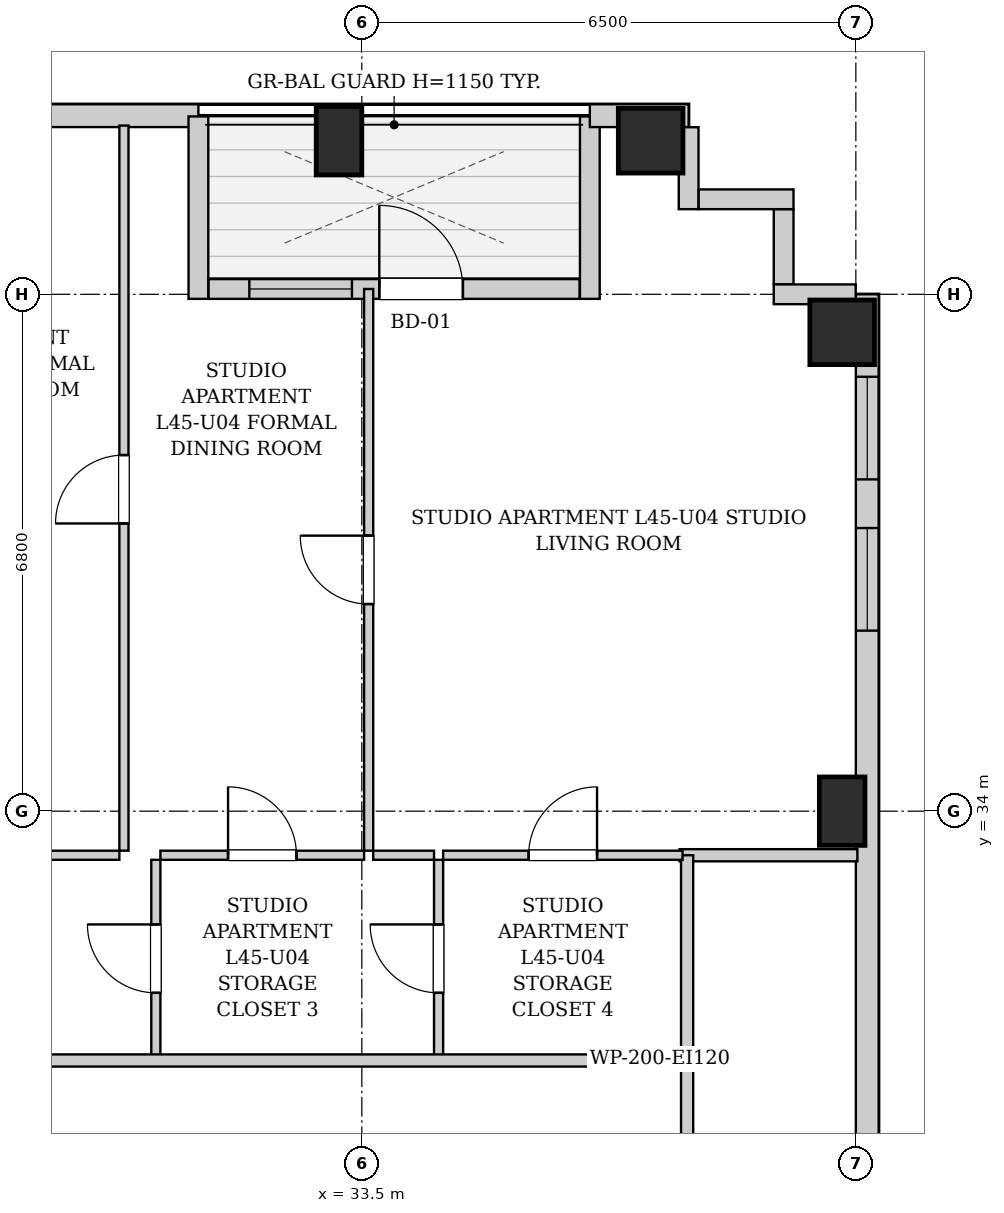
"""IFC4 building model, lengths in metres.
Left out: names, types, materials, properties, quantities, classifications, styles, units other than length and angle.
Written with IfcOpenShell. Run it as: python <this file> out.ifc"""

import sys

from ifc_helpers import new_model, si_unit, direction, frame, frame_2d, origin, origin_2d, place, context, subcontext, project, spatial, rectangle, extrude, element, fill, save


model = new_model("IFC4")
c1 = context("Model", 3, precision=1e-05, world=origin(), true_north=direction((0.0, 1.0)))
c2 = subcontext(c1, "Body", "Model", "MODEL_VIEW")
j1 = project(units=[si_unit("LENGTHUNIT", "METRE"), si_unit("PLANEANGLEUNIT", "RADIAN")], contexts=[c1])
p1 = place(None, origin())
s1 = spatial("IfcSite", under=j1, at=p1, CompositionType="ELEMENT")
p2 = place(p1, origin())
s2 = spatial("IfcBuilding", under=s1, at=p2, CompositionType="ELEMENT")
p3 = place(p2, frame((0.0, 0.0, 156.9)))
s3 = spatial("IfcBuildingStorey", under=s2, at=p3, CompositionType="ELEMENT", Elevation=156.9)
p4 = place(p3, frame((33.2, 42.82, 0.0), z_axis=(0.0, 0.0, 1.0), x_axis=(1.0, 0.0, 0.0)))
e1 = element("IfcColumn", 1, at=p4, inside=s3, PredefinedType="COLUMN", context=c2, shape_type="SweptSolid", body=[
    extrude(rectangle(XDim=0.6, YDim=0.9, at=origin_2d()), origin(), (0.0, 0.0, 1.0), 3.25),
])
p5 = place(p3, frame((37.3, 42.82, 0.0), z_axis=(0.0, 0.0, 1.0), x_axis=(1.0, 0.0, 0.0)))
e2 = element("IfcColumn", 2, at=p5, inside=s3, PredefinedType="COLUMN", context=c2, shape_type="SweptSolid", body=[
    extrude(rectangle(XDim=0.85, YDim=0.85, at=origin_2d()), origin(), (0.0, 0.0, 1.0), 3.25),
])
p6 = place(p3, frame((39.82, 34.0, 0.0), z_axis=(0.0, 0.0, 1.0), x_axis=(1.0, 0.0, 0.0)))
e3 = element("IfcColumn", 3, at=p6, inside=s3, PredefinedType="COLUMN", context=c2, shape_type="SweptSolid", body=[
    extrude(rectangle(XDim=0.6, YDim=0.9, at=origin_2d()), origin(), (0.0, 0.0, 1.0), 3.25),
])
p7 = place(p3, frame((39.82, 40.3, 0.0), z_axis=(0.0, 0.0, 1.0), x_axis=(1.0, 0.0, 0.0)))
e4 = element("IfcColumn", 4, at=p7, inside=s3, PredefinedType="COLUMN", context=c2, shape_type="SweptSolid", body=[
    extrude(rectangle(XDim=0.85, YDim=0.85, at=origin_2d()), origin(), (0.0, 0.0, 1.0), 3.25),
])
p8 = place(p3, frame((10.0, 43.15, 0.0), z_axis=(0.0, 0.0, 1.0), x_axis=(1.0, 0.0, 0.0)))
e5 = element("IfcWall", 5, at=p8, inside=s3, PredefinedType="SOLIDWALL", context=c2, shape_type="SweptSolid", body=[
    extrude(rectangle(XDim=21.35, YDim=0.3, at=frame_2d((10.675, 0.0))), origin(), (0.0, 0.0, 1.0), 2.99),
])
p9 = place(p8, frame((1.956, 0.0, 0.55)))
e6 = element("IfcOpeningElement", 6, at=p9, cuts=e5, PredefinedType="OPENING", context=c2, shape_type="SweptSolid", body=[
    extrude(rectangle(XDim=1.35, YDim=1.2, at=frame_2d((0.675, 0.6))), frame((0.0, 0.16, 0.0), z_axis=(0.0, -1.0, 0.0), x_axis=(1.0, 0.0, 0.0)), (0.0, 0.0, 1.0), 0.32),
])
p10 = place(p8, frame((5.189, 0.0, 0.55)))
e7 = element("IfcOpeningElement", 7, at=p10, cuts=e5, PredefinedType="OPENING", context=c2, shape_type="SweptSolid", body=[
    extrude(rectangle(XDim=1.35, YDim=1.2, at=frame_2d((0.675, 0.6))), frame((0.0, 0.16, 0.0), z_axis=(0.0, -1.0, 0.0), x_axis=(1.0, 0.0, 0.0)), (0.0, 0.0, 1.0), 0.32),
])
p11 = place(p8, frame((8.421, 0.0, 0.55)))
e8 = element("IfcOpeningElement", 8, at=p11, cuts=e5, PredefinedType="OPENING", context=c2, shape_type="SweptSolid", body=[
    extrude(rectangle(XDim=1.35, YDim=1.2, at=frame_2d((0.675, 0.6))), frame((0.0, 0.16, 0.0), z_axis=(0.0, -1.0, 0.0), x_axis=(1.0, 0.0, 0.0)), (0.0, 0.0, 1.0), 0.32),
])
p12 = place(p8, frame((11.15, 0.0, 0.55)))
e9 = element("IfcOpeningElement", 9, at=p12, cuts=e5, PredefinedType="OPENING", context=c2, shape_type="SweptSolid", body=[
    extrude(rectangle(XDim=1.35, YDim=1.2, at=frame_2d((0.675, 0.6))), frame((0.0, 0.16, 0.0), z_axis=(0.0, -1.0, 0.0), x_axis=(1.0, 0.0, 0.0)), (0.0, 0.0, 1.0), 0.32),
])
p13 = place(p8, frame((18.044, 0.0, 0.55)))
e10 = element("IfcOpeningElement", 10, at=p13, cuts=e5, PredefinedType="OPENING", context=c2, shape_type="SweptSolid", body=[
    extrude(rectangle(XDim=1.35, YDim=1.2, at=frame_2d((0.675, 0.6))), frame((0.0, 0.16, 0.0), z_axis=(0.0, -1.0, 0.0), x_axis=(1.0, 0.0, 0.0)), (0.0, 0.0, 1.0), 0.32),
])
p14 = place(p3, frame((31.35, 43.14, 0.0), z_axis=(0.0, 0.0, 1.0), x_axis=(0.0, -1.0, 0.0)))
e11 = element("IfcWall", 11, at=p14, inside=s3, PredefinedType="SOLIDWALL", context=c2, shape_type="SweptSolid", body=[
    extrude(rectangle(XDim=2.4, YDim=0.26, at=frame_2d((1.2, 0.0))), origin(), (0.0, 0.0, 1.0), 2.99),
])
p15 = place(p3, frame((31.484, 40.87, 0.0), z_axis=(0.0, 0.0, 1.0), x_axis=(1.0, 0.0, 0.0)))
e12 = element("IfcWall", 12, at=p15, inside=s3, PredefinedType="SOLIDWALL", context=c2, shape_type="SweptSolid", body=[
    extrude(rectangle(XDim=4.882, YDim=0.26, at=frame_2d((2.441, 0.0))), origin(), (0.0, 0.0, 1.0), 2.99),
])
p16 = place(p15, frame((2.246, 0.0, 0.0)))
e13 = element("IfcOpeningElement", 13, at=p16, cuts=e12, PredefinedType="OPENING", context=c2, shape_type="SweptSolid", body=[
    extrude(rectangle(XDim=1.1, YDim=2.0, at=frame_2d((0.55, 1.0))), frame((0.0, 0.14, 0.0), z_axis=(0.0, -1.0, 0.0), x_axis=(1.0, 0.0, 0.0)), (0.0, 0.0, 1.0), 0.28),
])
p17 = place(p15, frame((0.536, 0.0, 0.55)))
e14 = element("IfcOpeningElement", 14, at=p17, cuts=e12, PredefinedType="OPENING", context=c2, shape_type="SweptSolid", body=[
    extrude(rectangle(XDim=1.35, YDim=1.2, at=frame_2d((0.675, 0.6))), frame((0.0, 0.14, 0.0), z_axis=(0.0, -1.0, 0.0), x_axis=(1.0, 0.0, 0.0)), (0.0, 0.0, 1.0), 0.28),
])
p18 = place(p3, frame((36.5, 40.74, 0.0), z_axis=(0.0, 0.0, 1.0), x_axis=(0.0, 1.0, 0.0)))
e15 = element("IfcWall", 15, at=p18, inside=s3, PredefinedType="SOLIDWALL", context=c2, shape_type="SweptSolid", body=[
    extrude(rectangle(XDim=2.4, YDim=0.26, at=frame_2d((1.2, 0.0))), origin(), (0.0, 0.0, 1.0), 2.99),
])
p19 = place(p3, frame((36.5, 43.15, 0.0), z_axis=(0.0, 0.0, 1.0), x_axis=(1.0, 0.0, 0.0)))
e16 = element("IfcWall", 16, at=p19, inside=s3, PredefinedType="SOLIDWALL", context=c2, shape_type="SweptSolid", body=[
    extrude(rectangle(XDim=1.3, YDim=0.3, at=frame_2d((0.65, 0.0))), origin(), (0.0, 0.0, 1.0), 2.99),
])
p20 = place(p3, frame((40.15, 40.8, 0.0), z_axis=(0.0, 0.0, 1.0), x_axis=(0.0, -1.0, 0.0)))
e17 = element("IfcWall", 17, at=p20, inside=s3, PredefinedType="SOLIDWALL", context=c2, shape_type="SweptSolid", body=[
    extrude(rectangle(XDim=34.5, YDim=0.3, at=frame_2d((17.25, 0.0))), origin(), (0.0, 0.0, 1.0), 2.99),
])
p21 = place(p20, frame((31.575, 0.0, 0.55)))
e18 = element("IfcOpeningElement", 18, at=p21, cuts=e17, PredefinedType="OPENING", context=c2, shape_type="SweptSolid", body=[
    extrude(rectangle(XDim=1.35, YDim=1.2, at=frame_2d((0.675, 0.6))), frame((0.0, 0.16, 0.0), z_axis=(0.0, -1.0, 0.0), x_axis=(1.0, 0.0, 0.0)), (0.0, 0.0, 1.0), 0.32),
])
p22 = place(p20, frame((3.075, 0.0, 0.55)))
e19 = element("IfcOpeningElement", 19, at=p22, cuts=e17, PredefinedType="OPENING", context=c2, shape_type="SweptSolid", body=[
    extrude(rectangle(XDim=1.35, YDim=1.2, at=frame_2d((0.675, 0.6))), frame((0.0, 0.16, 0.0), z_axis=(0.0, -1.0, 0.0), x_axis=(1.0, 0.0, 0.0)), (0.0, 0.0, 1.0), 0.32),
])
p23 = place(p20, frame((1.085, 0.0, 0.55)))
e20 = element("IfcOpeningElement", 20, at=p23, cuts=e17, PredefinedType="OPENING", context=c2, shape_type="SweptSolid", body=[
    extrude(rectangle(XDim=1.35, YDim=1.2, at=frame_2d((0.675, 0.6))), frame((0.0, 0.16, 0.0), z_axis=(0.0, -1.0, 0.0), x_axis=(1.0, 0.0, 0.0)), (0.0, 0.0, 1.0), 0.32),
])
p24 = place(p20, frame((22.8, 0.0, 0.55)))
e21 = element("IfcOpeningElement", 21, at=p24, cuts=e17, PredefinedType="OPENING", context=c2, shape_type="SweptSolid", body=[
    extrude(rectangle(XDim=1.35, YDim=1.2, at=frame_2d((0.675, 0.6))), frame((0.0, 0.16, 0.0), z_axis=(0.0, -1.0, 0.0), x_axis=(1.0, 0.0, 0.0)), (0.0, 0.0, 1.0), 0.32),
])
p25 = place(p20, frame((13.425, 0.0, 0.55)))
e22 = element("IfcOpeningElement", 22, at=p25, cuts=e17, PredefinedType="OPENING", context=c2, shape_type="SweptSolid", body=[
    extrude(rectangle(XDim=1.35, YDim=1.2, at=frame_2d((0.675, 0.6))), frame((0.0, 0.16, 0.0), z_axis=(0.0, -1.0, 0.0), x_axis=(1.0, 0.0, 0.0)), (0.0, 0.0, 1.0), 0.32),
])
p26 = place(p3, frame((37.8, 42.998, 0.0), z_axis=(0.0, 0.0, 1.0), x_axis=(0.0, -1.0, 0.0)))
e23 = element("IfcWall", 23, at=p26, inside=s3, PredefinedType="SOLIDWALL", context=c2, shape_type="SweptSolid", body=[
    extrude(rectangle(XDim=1.078, YDim=0.26, at=frame_2d((0.539, 0.0))), origin(), (0.0, 0.0, 1.0), 2.99),
])
p27 = place(p3, frame((37.932, 42.05, 0.0), z_axis=(0.0, 0.0, 1.0), x_axis=(1.0, 0.0, 0.0)))
e24 = element("IfcWall", 24, at=p27, inside=s3, PredefinedType="SOLIDWALL", context=c2, shape_type="SweptSolid", body=[
    extrude(rectangle(XDim=1.248, YDim=0.26, at=frame_2d((0.624, 0.0))), origin(), (0.0, 0.0, 1.0), 2.99),
])
p28 = place(p3, frame((39.05, 41.918, 0.0), z_axis=(0.0, 0.0, 1.0), x_axis=(0.0, -1.0, 0.0)))
e25 = element("IfcWall", 25, at=p28, inside=s3, PredefinedType="SOLIDWALL", context=c2, shape_type="SweptSolid", body=[
    extrude(rectangle(XDim=0.986, YDim=0.26, at=frame_2d((0.493, 0.0))), origin(), (0.0, 0.0, 1.0), 2.99),
])
p29 = place(p3, frame((38.92, 40.8, 0.0), z_axis=(0.0, 0.0, 1.0), x_axis=(1.0, 0.0, 0.0)))
e26 = element("IfcWall", 26, at=p29, inside=s3, PredefinedType="SOLIDWALL", context=c2, shape_type="SweptSolid", body=[
    extrude(rectangle(XDim=1.078, YDim=0.26, at=frame_2d((0.539, 0.0))), origin(), (0.0, 0.0, 1.0), 2.99),
])
p30 = place(p3, frame((37.78, 28.98, 0.0), z_axis=(0.0, 0.0, 1.0), x_axis=(0.0, 1.0, 0.0)))
e27 = element("IfcWall", 27, at=p30, inside=s3, PredefinedType="PARTITIONING", context=c2, shape_type="SweptSolid", body=[
    extrude(rectangle(XDim=1.74, YDim=0.16, at=frame_2d((0.87, 0.0))), origin(), (0.0, 0.0, 1.0), 2.99),
])
p31 = place(p3, frame((37.68, 33.42, 0.0), z_axis=(0.0, 0.0, 1.0), x_axis=(1.0, 0.0, 0.0)))
e28 = element("IfcWall", 28, at=p31, inside=s3, PredefinedType="PARTITIONING", context=c2, shape_type="SweptSolid", body=[
    extrude(rectangle(XDim=2.34, YDim=0.16, at=frame_2d((1.17, 0.0))), origin(), (0.0, 0.0, 1.0), 2.99),
])
p32 = place(p3, frame((37.78, 30.76, 0.0), z_axis=(0.0, 0.0, 1.0), x_axis=(0.0, 1.0, 0.0)))
e29 = element("IfcWall", 29, at=p32, inside=s3, PredefinedType="PARTITIONING", context=c2, shape_type="SweptSolid", body=[
    extrude(rectangle(XDim=2.66, YDim=0.16, at=frame_2d((1.33, 0.0))), origin(), (0.0, 0.0, 1.0), 2.99),
])
p33 = place(p3, frame((30.79, 30.76, 0.0), z_axis=(0.0, 0.0, 1.0), x_axis=(0.0, 1.0, 0.0)))
e30 = element("IfcWall", 30, at=p33, inside=s3, PredefinedType="PARTITIONING", context=c2, shape_type="SweptSolid", body=[
    extrude(rectangle(XDim=2.6, YDim=0.12, at=frame_2d((1.3, 0.0))), origin(), (0.0, 0.0, 1.0), 2.99),
])
p34 = place(p33, frame((0.85, 0.0, 0.0)))
e31 = element("IfcOpeningElement", 31, at=p34, cuts=e30, PredefinedType="OPENING", context=c2, shape_type="SweptSolid", body=[
    extrude(rectangle(XDim=0.9, YDim=2.05, at=frame_2d((0.45, 1.025))), frame((0.0, 0.07, 0.0), z_axis=(0.0, -1.0, 0.0), x_axis=(1.0, 0.0, 0.0)), (0.0, 0.0, 1.0), 0.14),
])
p35 = place(p3, frame((27.58, 33.42, 0.0), z_axis=(0.0, 0.0, 1.0), x_axis=(1.0, 0.0, 0.0)))
e32 = element("IfcWall", 32, at=p35, inside=s3, PredefinedType="PARTITIONING", context=c2, shape_type="SweptSolid", body=[
    extrude(rectangle(XDim=2.73, YDim=0.12, at=frame_2d((1.365, 0.0))), origin(), (0.0, 0.0, 1.0), 2.99),
])
p36 = place(p35, frame((0.915, 0.0, 0.0)))
e33 = element("IfcOpeningElement", 33, at=p36, cuts=e32, PredefinedType="OPENING", context=c2, shape_type="SweptSolid", body=[
    extrude(rectangle(XDim=0.9, YDim=2.05, at=frame_2d((0.45, 1.025))), frame((0.0, 0.07, 0.0), z_axis=(0.0, -1.0, 0.0), x_axis=(1.0, 0.0, 0.0)), (0.0, 0.0, 1.0), 0.14),
])
p37 = place(p3, frame((34.51, 30.76, 0.0), z_axis=(0.0, 0.0, 1.0), x_axis=(0.0, 1.0, 0.0)))
e34 = element("IfcWall", 34, at=p37, inside=s3, PredefinedType="PARTITIONING", context=c2, shape_type="SweptSolid", body=[
    extrude(rectangle(XDim=2.6, YDim=0.12, at=frame_2d((1.3, 0.0))), origin(), (0.0, 0.0, 1.0), 2.99),
])
p38 = place(p37, frame((0.85, 0.0, 0.0)))
e35 = element("IfcOpeningElement", 35, at=p38, cuts=e34, PredefinedType="OPENING", context=c2, shape_type="SweptSolid", body=[
    extrude(rectangle(XDim=0.9, YDim=2.05, at=frame_2d((0.45, 1.025))), frame((0.0, 0.07, 0.0), z_axis=(0.0, -1.0, 0.0), x_axis=(1.0, 0.0, 0.0)), (0.0, 0.0, 1.0), 0.14),
])
p39 = place(p3, frame((30.85, 33.42, 0.0), z_axis=(0.0, 0.0, 1.0), x_axis=(1.0, 0.0, 0.0)))
e36 = element("IfcWall", 36, at=p39, inside=s3, PredefinedType="PARTITIONING", context=c2, shape_type="SweptSolid", body=[
    extrude(rectangle(XDim=2.68, YDim=0.12, at=frame_2d((1.34, 0.0))), origin(), (0.0, 0.0, 1.0), 2.99),
])
p40 = place(p39, frame((0.89, 0.0, 0.0)))
e37 = element("IfcOpeningElement", 37, at=p40, cuts=e36, PredefinedType="OPENING", context=c2, shape_type="SweptSolid", body=[
    extrude(rectangle(XDim=0.9, YDim=2.05, at=frame_2d((0.45, 1.025))), frame((0.0, 0.07, 0.0), z_axis=(0.0, -1.0, 0.0), x_axis=(1.0, 0.0, 0.0)), (0.0, 0.0, 1.0), 0.14),
])
p41 = place(p3, frame((33.65, 33.42, 0.0), z_axis=(0.0, 0.0, 1.0), x_axis=(1.0, 0.0, 0.0)))
e38 = element("IfcWall", 38, at=p41, inside=s3, PredefinedType="PARTITIONING", context=c2, shape_type="SweptSolid", body=[
    extrude(rectangle(XDim=0.8, YDim=0.12, at=frame_2d((0.4, 0.0))), origin(), (0.0, 0.0, 1.0), 2.99),
])
p42 = place(p3, frame((34.57, 33.42, 0.0), z_axis=(0.0, 0.0, 1.0), x_axis=(1.0, 0.0, 0.0)))
e39 = element("IfcWall", 39, at=p42, inside=s3, PredefinedType="PARTITIONING", context=c2, shape_type="SweptSolid", body=[
    extrude(rectangle(XDim=3.15, YDim=0.12, at=frame_2d((1.575, 0.0))), origin(), (0.0, 0.0, 1.0), 2.99),
])
p43 = place(p42, frame((1.125, 0.0, 0.0)))
e40 = element("IfcOpeningElement", 40, at=p43, cuts=e39, PredefinedType="OPENING", context=c2, shape_type="SweptSolid", body=[
    extrude(rectangle(XDim=0.9, YDim=2.05, at=frame_2d((0.45, 1.025))), frame((0.0, 0.07, 0.0), z_axis=(0.0, -1.0, 0.0), x_axis=(1.0, 0.0, 0.0)), (0.0, 0.0, 1.0), 0.14),
])
p44 = place(p3, frame((30.37, 33.48, 0.0), z_axis=(0.0, 0.0, 1.0), x_axis=(0.0, 1.0, 0.0)))
e41 = element("IfcWall", 41, at=p44, inside=s3, PredefinedType="PARTITIONING", context=c2, shape_type="SweptSolid", body=[
    extrude(rectangle(XDim=9.54, YDim=0.12, at=frame_2d((4.77, 0.0))), origin(), (0.0, 0.0, 1.0), 2.99),
])
p45 = place(p44, frame((4.305, 0.0, 0.0)))
e42 = element("IfcOpeningElement", 42, at=p45, cuts=e41, PredefinedType="OPENING", context=c2, shape_type="SweptSolid", body=[
    extrude(rectangle(XDim=0.9, YDim=2.05, at=frame_2d((0.45, 1.025))), frame((0.0, 0.07, 0.0), z_axis=(0.0, -1.0, 0.0), x_axis=(1.0, 0.0, 0.0)), (0.0, 0.0, 1.0), 0.14),
])
p46 = place(p3, frame((33.59, 33.48, 0.0), z_axis=(0.0, 0.0, 1.0), x_axis=(0.0, 1.0, 0.0)))
e43 = element("IfcWall", 43, at=p46, inside=s3, PredefinedType="PARTITIONING", context=c2, shape_type="SweptSolid", body=[
    extrude(rectangle(XDim=7.39, YDim=0.12, at=frame_2d((3.695, 0.0))), origin(), (0.0, 0.0, 1.0), 2.99),
])
p47 = place(p46, frame((3.245, 0.0, 0.0)))
e44 = element("IfcOpeningElement", 44, at=p47, cuts=e43, PredefinedType="OPENING", context=c2, shape_type="SweptSolid", body=[
    extrude(rectangle(XDim=0.9, YDim=2.05, at=frame_2d((0.45, 1.025))), frame((0.0, 0.07, 0.0), z_axis=(0.0, -1.0, 0.0), x_axis=(1.0, 0.0, 0.0)), (0.0, 0.0, 1.0), 0.14),
])
p48 = place(p3, frame((10.05, 30.72, 0.0), z_axis=(0.0, 0.0, 1.0), x_axis=(1.0, 0.0, 0.0)))
e45 = element("IfcWall", 45, at=p48, inside=s3, PredefinedType="PARTITIONING", context=c2, shape_type="SweptSolid", body=[
    extrude(rectangle(XDim=27.7, YDim=0.16, at=frame_2d((13.85, 0.0))), origin(), (0.0, 0.0, 1.0), 2.99),
])
p49 = place(p48, frame((4.165, 0.0, 0.0)))
e46 = element("IfcOpeningElement", 46, at=p49, cuts=e45, PredefinedType="OPENING", context=c2, shape_type="SweptSolid", body=[
    extrude(rectangle(XDim=0.95, YDim=2.1, at=frame_2d((0.475, 1.05))), frame((0.0, 0.09, 0.0), z_axis=(0.0, -1.0, 0.0), x_axis=(1.0, 0.0, 0.0)), (0.0, 0.0, 1.0), 0.18),
])
p50 = place(p34, origin())
e47 = element("IfcDoor", 47, at=p50, inside=s3, OperationType="SINGLE_SWING_RIGHT", PredefinedType="DOOR", context=c2, shape_type="SweptSolid", body=[
    extrude(rectangle(XDim=0.9, YDim=2.05, at=frame_2d((0.45, 1.025))), frame((0.0, 0.025, 0.0), z_axis=(0.0, -1.0, 0.0), x_axis=(1.0, 0.0, 0.0)), (0.0, 0.0, 1.0), 0.05),
])
fill(e31, e47)
p51 = place(p38, origin())
e48 = element("IfcDoor", 48, at=p51, inside=s3, OperationType="SINGLE_SWING_RIGHT", PredefinedType="DOOR", context=c2, shape_type="SweptSolid", body=[
    extrude(rectangle(XDim=0.9, YDim=2.05, at=frame_2d((0.45, 1.025))), frame((0.0, 0.025, 0.0), z_axis=(0.0, -1.0, 0.0), x_axis=(1.0, 0.0, 0.0)), (0.0, 0.0, 1.0), 0.05),
])
fill(e35, e48)
p52 = place(p40, origin())
e49 = element("IfcDoor", 49, at=p52, inside=s3, OperationType="SINGLE_SWING_LEFT", PredefinedType="DOOR", context=c2, shape_type="SweptSolid", body=[
    extrude(rectangle(XDim=0.9, YDim=2.05, at=frame_2d((0.45, 1.025))), frame((0.0, 0.025, 0.0), z_axis=(0.0, -1.0, 0.0), x_axis=(1.0, 0.0, 0.0)), (0.0, 0.0, 1.0), 0.05),
])
fill(e37, e49)
p53 = place(p43, origin())
e50 = element("IfcDoor", 50, at=p53, inside=s3, OperationType="SINGLE_SWING_RIGHT", PredefinedType="DOOR", context=c2, shape_type="SweptSolid", body=[
    extrude(rectangle(XDim=0.9, YDim=2.05, at=frame_2d((0.45, 1.025))), frame((0.0, 0.025, 0.0), z_axis=(0.0, -1.0, 0.0), x_axis=(1.0, 0.0, 0.0)), (0.0, 0.0, 1.0), 0.05),
])
fill(e40, e50)
p54 = place(p45, origin())
e51 = element("IfcDoor", 51, at=p54, inside=s3, OperationType="SINGLE_SWING_LEFT", PredefinedType="DOOR", context=c2, shape_type="SweptSolid", body=[
    extrude(rectangle(XDim=0.9, YDim=2.05, at=frame_2d((0.45, 1.025))), frame((0.0, 0.025, 0.0), z_axis=(0.0, -1.0, 0.0), x_axis=(1.0, 0.0, 0.0)), (0.0, 0.0, 1.0), 0.05),
])
fill(e42, e51)
p55 = place(p47, origin())
e52 = element("IfcDoor", 52, at=p55, inside=s3, OperationType="SINGLE_SWING_RIGHT", PredefinedType="DOOR", context=c2, shape_type="SweptSolid", body=[
    extrude(rectangle(XDim=0.9, YDim=2.05, at=frame_2d((0.45, 1.025))), frame((0.0, 0.025, 0.0), z_axis=(0.0, -1.0, 0.0), x_axis=(1.0, 0.0, 0.0)), (0.0, 0.0, 1.0), 0.05),
])
fill(e44, e52)
p56 = place(p16, origin())
e53 = element("IfcDoor", 53, at=p56, inside=s3, OperationType="SINGLE_SWING_LEFT", PredefinedType="DOOR", context=c2, shape_type="SweptSolid", body=[
    extrude(rectangle(XDim=1.1, YDim=2.0, at=frame_2d((0.55, 1.0))), frame((0.0, 0.025, 0.0), z_axis=(0.0, -1.0, 0.0), x_axis=(1.0, 0.0, 0.0)), (0.0, 0.0, 1.0), 0.05),
])
fill(e13, e53)
p57 = place(p17, origin())
e54 = element("IfcWindow", 54, at=p57, inside=s3, PartitioningType="SINGLE_PANEL", PredefinedType="WINDOW", context=c2, shape_type="SweptSolid", body=[
    extrude(rectangle(XDim=1.35, YDim=1.2, at=frame_2d((0.675, 0.6))), frame((0.0, 0.03, 0.0), z_axis=(0.0, -1.0, 0.0), x_axis=(1.0, 0.0, 0.0)), (0.0, 0.0, 1.0), 0.06),
])
fill(e14, e54)
p58 = place(p22, origin())
e55 = element("IfcWindow", 55, at=p58, inside=s3, PartitioningType="SINGLE_PANEL", PredefinedType="WINDOW", context=c2, shape_type="SweptSolid", body=[
    extrude(rectangle(XDim=1.35, YDim=1.2, at=frame_2d((0.675, 0.6))), frame((0.0, 0.03, 0.0), z_axis=(0.0, -1.0, 0.0), x_axis=(1.0, 0.0, 0.0)), (0.0, 0.0, 1.0), 0.06),
])
fill(e19, e55)
p59 = place(p23, origin())
e56 = element("IfcWindow", 56, at=p59, inside=s3, PartitioningType="SINGLE_PANEL", PredefinedType="WINDOW", context=c2, shape_type="SweptSolid", body=[
    extrude(rectangle(XDim=1.35, YDim=1.2, at=frame_2d((0.675, 0.6))), frame((0.0, 0.03, 0.0), z_axis=(0.0, -1.0, 0.0), x_axis=(1.0, 0.0, 0.0)), (0.0, 0.0, 1.0), 0.06),
])
fill(e20, e56)
save(model, sys.argv[1])
